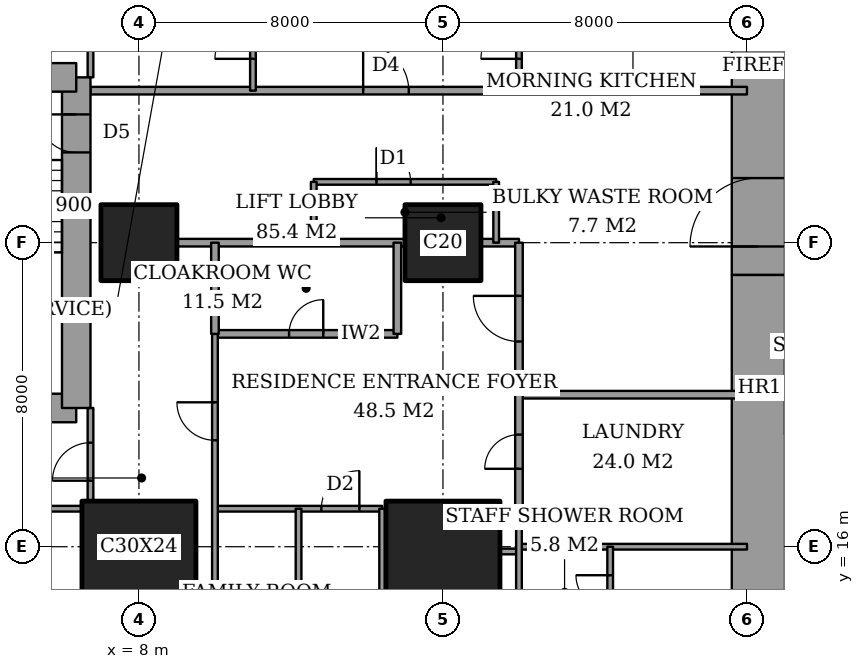
"""IFC4 building model, lengths in metres.
Left out: names, types, materials, properties, quantities, classifications, styles, units other than length and angle.
Written with IfcOpenShell. Run it as: python <this file> out.ifc"""

import sys

from ifc_helpers import new_model, si_unit, direction, frame, frame_2d, origin, origin_2d, place, context, subcontext, project, spatial, rectangle, extrude, element, fill, save


model = new_model("IFC4")
c1 = context("Model", 3, precision=1e-05, world=origin(), true_north=direction((0.0, 1.0)))
c2 = subcontext(c1, "Body", "Model", "MODEL_VIEW")
j1 = project(units=[si_unit("LENGTHUNIT", "METRE"), si_unit("PLANEANGLEUNIT", "RADIAN")], contexts=[c1])
p1 = place(None, origin())
s1 = spatial("IfcSite", under=j1, at=p1, CompositionType="ELEMENT")
p2 = place(p1, origin())
s2 = spatial("IfcBuilding", under=s1, at=p2, CompositionType="ELEMENT")
p3 = place(p2, frame((0.0, 0.0, 128.6)))
s3 = spatial("IfcBuildingStorey", under=s2, at=p3, CompositionType="ELEMENT", Elevation=128.6)
p4 = place(p3, frame((8.0, 16.0, 0.0), z_axis=(0.0, 0.0, 1.0), x_axis=(1.0, 0.0, 0.0)))
e1 = element("IfcColumn", 1, at=p4, inside=s3, PredefinedType="COLUMN", context=c2, shape_type="SweptSolid", body=[
    extrude(rectangle(XDim=3.0, YDim=2.4, at=origin_2d()), origin(), (0.0, 0.0, 1.0), 3.6),
])
p5 = place(p3, frame((8.0, 24.0, 0.0), z_axis=(0.0, 0.0, 1.0), x_axis=(1.0, 0.0, 0.0)))
e2 = element("IfcColumn", 2, at=p5, inside=s3, PredefinedType="COLUMN", context=c2, shape_type="SweptSolid", body=[
    extrude(rectangle(XDim=2.0, YDim=2.0, at=origin_2d()), origin(), (0.0, 0.0, 1.0), 3.6),
])
p6 = place(p3, frame((16.0, 16.0, 0.0), z_axis=(0.0, 0.0, 1.0), x_axis=(1.0, 0.0, 0.0)))
e3 = element("IfcColumn", 3, at=p6, inside=s3, PredefinedType="COLUMN", context=c2, shape_type="SweptSolid", body=[
    extrude(rectangle(XDim=3.0, YDim=2.4, at=origin_2d()), origin(), (0.0, 0.0, 1.0), 3.6),
])
p7 = place(p3, frame((16.0, 24.0, 0.0), z_axis=(0.0, 0.0, 1.0), x_axis=(1.0, 0.0, 0.0)))
e4 = element("IfcColumn", 4, at=p7, inside=s3, PredefinedType="COLUMN", context=c2, shape_type="SweptSolid", body=[
    extrude(rectangle(XDim=2.0, YDim=2.0, at=origin_2d()), origin(), (0.0, 0.0, 1.0), 3.6),
])
p8 = place(p3, frame((24.3, 13.0, 0.0), z_axis=(0.0, 0.0, 1.0), x_axis=(0.0, 1.0, 0.0)))
e5 = element("IfcWall", 5, at=p8, inside=s3, PredefinedType="SHEAR", context=c2, shape_type="SweptSolid", body=[
    extrude(rectangle(XDim=10.15, YDim=1.4, at=frame_2d((5.075, 0.0))), origin(), (0.0, 0.0, 1.0), 3.6),
])
p9 = place(p3, frame((24.3, 23.15, 0.0), z_axis=(0.0, 0.0, 1.0), x_axis=(0.0, 1.0, 0.0)))
e6 = element("IfcWall", 6, at=p9, inside=s3, PredefinedType="SHEAR", context=c2, shape_type="SweptSolid", body=[
    extrude(rectangle(XDim=11.85, YDim=1.4, at=frame_2d((5.925, 0.0))), origin(), (0.0, 0.0, 1.0), 3.6),
])
p10 = place(p9, frame((0.75, 0.0, 0.0)))
e7 = element("IfcOpeningElement", 7, at=p10, cuts=e6, PredefinedType="OPENING", context=c2, shape_type="SweptSolid", body=[
    extrude(rectangle(XDim=1.8, YDim=2.4, at=frame_2d((0.9, 1.2))), frame((0.0, 0.71, 0.0), z_axis=(0.0, -1.0, 0.0), x_axis=(1.0, 0.0, 0.0)), (0.0, 0.0, 1.0), 1.42),
])
p11 = place(p3, frame((1.9, 19.65, 0.0), z_axis=(0.0, 0.0, 1.0), x_axis=(1.0, 0.0, 0.0)))
e8 = element("IfcWall", 8, at=p11, inside=s3, PredefinedType="SHEAR", context=c2, shape_type="SweptSolid", body=[
    extrude(rectangle(XDim=4.45, YDim=0.75, at=frame_2d((2.225, 0.0))), origin(), (0.0, 0.0, 1.0), 3.6),
])
p12 = place(p3, frame((6.35, 19.65, 0.0), z_axis=(0.0, 0.0, 1.0), x_axis=(0.0, 1.0, 0.0)))
e9 = element("IfcWall", 9, at=p12, inside=s3, PredefinedType="SHEAR", context=c2, shape_type="SweptSolid", body=[
    extrude(rectangle(XDim=8.7, YDim=0.75, at=frame_2d((4.35, 0.0))), origin(), (0.0, 0.0, 1.0), 3.6),
])
p13 = place(p12, frame((6.725, 0.0, 0.0)))
e10 = element("IfcOpeningElement", 10, at=p13, cuts=e9, PredefinedType="OPENING", context=c2, shape_type="SweptSolid", body=[
    extrude(rectangle(XDim=1.0, YDim=2.1, at=frame_2d((0.5, 1.05))), frame((0.0, 0.385, 0.0), z_axis=(0.0, -1.0, 0.0), x_axis=(1.0, 0.0, 0.0)), (0.0, 0.0, 1.0), 0.77),
])
p14 = place(p3, frame((6.35, 28.35, 0.0), z_axis=(0.0, 0.0, 1.0), x_axis=(-1.0, 0.0, 0.0)))
e11 = element("IfcWall", 11, at=p14, inside=s3, PredefinedType="SHEAR", context=c2, shape_type="SweptSolid", body=[
    extrude(rectangle(XDim=4.45, YDim=0.75, at=frame_2d((2.225, 0.0))), origin(), (0.0, 0.0, 1.0), 3.6),
])
p15 = place(p3, frame((17.5, 15.875, 0.0), z_axis=(0.0, 0.0, 1.0), x_axis=(1.0, 0.0, 0.0)))
e12 = element("IfcWall", 12, at=p15, inside=s3, PredefinedType="PARTITIONING", context=c2, shape_type="SweptSolid", body=[
    extrude(rectangle(XDim=0.5, YDim=0.15, at=frame_2d((0.25, 0.0))), origin(), (0.0, 0.0, 1.0), 3.35),
])
p16 = place(p3, frame((18.0, 16.0, 0.0), z_axis=(0.0, 0.0, 1.0), x_axis=(1.0, 0.0, 0.0)))
e13 = element("IfcWall", 13, at=p16, inside=s3, PredefinedType="PARTITIONING", context=c2, shape_type="SweptSolid", body=[
    extrude(rectangle(XDim=6.0, YDim=0.15, at=frame_2d((3.0, 0.0))), origin(), (0.0, 0.0, 1.0), 3.35),
])
p17 = place(p3, frame((1.35, 17.0, 0.0), z_axis=(0.0, 0.0, 1.0), x_axis=(1.0, 0.0, 0.0)))
e14 = element("IfcWall", 14, at=p17, inside=s3, PredefinedType="PARTITIONING", context=c2, shape_type="SweptSolid", body=[
    extrude(rectangle(XDim=5.15, YDim=0.15, at=frame_2d((2.575, 0.0))), origin(), (0.0, 0.0, 1.0), 3.35),
])
p18 = place(p3, frame((10.0, 17.0, 0.0), z_axis=(0.0, 0.0, 1.0), x_axis=(1.0, 0.0, 0.0)))
e15 = element("IfcWall", 15, at=p18, inside=s3, PredefinedType="PARTITIONING", context=c2, shape_type="SweptSolid", body=[
    extrude(rectangle(XDim=4.4, YDim=0.15, at=frame_2d((2.2, 0.0))), origin(), (0.0, 0.0, 1.0), 3.35),
])
p19 = place(p18, frame((2.8, 0.0, 0.0)))
e16 = element("IfcOpeningElement", 16, at=p19, cuts=e15, PredefinedType="OPENING", context=c2, shape_type="SweptSolid", body=[
    extrude(rectangle(XDim=1.0, YDim=2.1, at=frame_2d((0.5, 1.05))), frame((0.0, 0.085, 0.0), z_axis=(0.0, -1.0, 0.0), x_axis=(1.0, 0.0, 0.0)), (0.0, 0.0, 1.0), 0.17),
])
p20 = place(p3, frame((18.0, 20.0, 0.0), z_axis=(0.0, 0.0, 1.0), x_axis=(1.0, 0.0, 0.0)))
e17 = element("IfcWall", 17, at=p20, inside=s3, PredefinedType="PARTITIONING", context=c2, shape_type="SweptSolid", body=[
    extrude(rectangle(XDim=6.0, YDim=0.2, at=frame_2d((3.0, 0.0))), origin(), (0.0, 0.0, 1.0), 3.35),
])
p21 = place(p3, frame((10.0, 21.6, 0.0), z_axis=(0.0, 0.0, 1.0), x_axis=(1.0, 0.0, 0.0)))
e18 = element("IfcWall", 18, at=p21, inside=s3, PredefinedType="PARTITIONING", context=c2, shape_type="SweptSolid", body=[
    extrude(rectangle(XDim=4.8, YDim=0.2, at=frame_2d((2.4, 0.0))), origin(), (0.0, 0.0, 1.0), 3.35),
])
p22 = place(p21, frame((1.95, 0.0, 0.0)))
e19 = element("IfcOpeningElement", 19, at=p22, cuts=e18, PredefinedType="OPENING", context=c2, shape_type="SweptSolid", body=[
    extrude(rectangle(XDim=0.9, YDim=2.1, at=frame_2d((0.45, 1.05))), frame((0.0, 0.11, 0.0), z_axis=(0.0, -1.0, 0.0), x_axis=(1.0, 0.0, 0.0)), (0.0, 0.0, 1.0), 0.22),
])
p23 = place(p3, frame((9.0, 24.0, 0.0), z_axis=(0.0, 0.0, 1.0), x_axis=(1.0, 0.0, 0.0)))
e20 = element("IfcWall", 20, at=p23, inside=s3, PredefinedType="PARTITIONING", context=c2, shape_type="SweptSolid", body=[
    extrude(rectangle(XDim=6.0, YDim=0.2, at=frame_2d((3.0, 0.0))), origin(), (0.0, 0.0, 1.0), 3.35),
])
p24 = place(p3, frame((17.0, 24.0, 0.0), z_axis=(0.0, 0.0, 1.0), x_axis=(1.0, 0.0, 0.0)))
e21 = element("IfcWall", 21, at=p24, inside=s3, PredefinedType="PARTITIONING", context=c2, shape_type="SweptSolid", body=[
    extrude(rectangle(XDim=1.0, YDim=0.2, at=frame_2d((0.5, 0.0))), origin(), (0.0, 0.0, 1.0), 3.35),
])
p25 = place(p3, frame((12.6, 25.6, 0.0), z_axis=(0.0, 0.0, 1.0), x_axis=(1.0, 0.0, 0.0)))
e22 = element("IfcWall", 22, at=p25, inside=s3, PredefinedType="PARTITIONING", context=c2, shape_type="SweptSolid", body=[
    extrude(rectangle(XDim=4.8, YDim=0.15, at=frame_2d((2.4, 0.0))), origin(), (0.0, 0.0, 1.0), 3.35),
])
p26 = place(p25, frame((1.65, 0.0, 0.0)))
e23 = element("IfcOpeningElement", 23, at=p26, cuts=e22, PredefinedType="OPENING", context=c2, shape_type="SweptSolid", body=[
    extrude(rectangle(XDim=0.9, YDim=2.1, at=frame_2d((0.45, 1.05))), frame((0.0, 0.085, 0.0), z_axis=(0.0, -1.0, 0.0), x_axis=(1.0, 0.0, 0.0)), (0.0, 0.0, 1.0), 0.17),
])
p27 = place(p3, frame((6.725, 28.0, 0.0), z_axis=(0.0, 0.0, 1.0), x_axis=(1.0, 0.0, 0.0)))
e24 = element("IfcWall", 24, at=p27, inside=s3, PredefinedType="PARTITIONING", context=c2, shape_type="SweptSolid", body=[
    extrude(rectangle(XDim=17.275, YDim=0.2, at=frame_2d((8.637, 0.0))), origin(), (0.0, 0.0, 1.0), 3.35),
])
p28 = place(p27, frame((7.175, 0.0, 0.0)))
e25 = element("IfcOpeningElement", 25, at=p28, cuts=e24, PredefinedType="OPENING", context=c2, shape_type="SweptSolid", body=[
    extrude(rectangle(XDim=1.2, YDim=2.4, at=frame_2d((0.6, 1.2))), frame((0.0, 0.11, 0.0), z_axis=(0.0, -1.0, 0.0), x_axis=(1.0, 0.0, 0.0)), (0.0, 0.0, 1.0), 0.22),
])
p29 = place(p3, frame((6.725, 17.2, 0.0), z_axis=(0.0, 0.0, 1.0), x_axis=(0.0, 1.0, 0.0)))
e26 = element("IfcWall", 26, at=p29, inside=s3, PredefinedType="PARTITIONING", context=c2, shape_type="SweptSolid", body=[
    extrude(rectangle(XDim=2.45, YDim=0.15, at=frame_2d((1.225, 0.0))), origin(), (0.0, 0.0, 1.0), 3.35),
])
p30 = place(p29, frame((0.538, 0.0, 0.0)))
e27 = element("IfcOpeningElement", 27, at=p30, cuts=e26, PredefinedType="OPENING", context=c2, shape_type="SweptSolid", body=[
    extrude(rectangle(XDim=1.0, YDim=2.1, at=frame_2d((0.5, 1.05))), frame((0.0, 0.085, 0.0), z_axis=(0.0, -1.0, 0.0), x_axis=(1.0, 0.0, 0.0)), (0.0, 0.0, 1.0), 0.17),
])
p31 = place(p3, frame((6.725, 28.35, 0.0), z_axis=(0.0, 0.0, 1.0), x_axis=(0.0, 1.0, 0.0)))
e28 = element("IfcWall", 28, at=p31, inside=s3, PredefinedType="PARTITIONING", context=c2, shape_type="SweptSolid", body=[
    extrude(rectangle(XDim=2.45, YDim=0.15, at=frame_2d((1.225, 0.0))), origin(), (0.0, 0.0, 1.0), 3.35),
])
p32 = place(p31, frame((0.913, 0.0, 0.0)))
e29 = element("IfcOpeningElement", 29, at=p32, cuts=e28, PredefinedType="OPENING", context=c2, shape_type="SweptSolid", body=[
    extrude(rectangle(XDim=1.0, YDim=2.1, at=frame_2d((0.5, 1.05))), frame((0.0, 0.085, 0.0), z_axis=(0.0, -1.0, 0.0), x_axis=(1.0, 0.0, 0.0)), (0.0, 0.0, 1.0), 0.17),
])
p33 = place(p3, frame((10.0, 21.6, 0.0), z_axis=(0.0, 0.0, 1.0), x_axis=(0.0, 1.0, 0.0)))
e30 = element("IfcWall", 30, at=p33, inside=s3, PredefinedType="PARTITIONING", context=c2, shape_type="SweptSolid", body=[
    extrude(rectangle(XDim=2.4, YDim=0.2, at=frame_2d((1.2, 0.0))), origin(), (0.0, 0.0, 1.0), 3.35),
])
p34 = place(p3, frame((10.0, 10.6, 0.0), z_axis=(0.0, 0.0, 1.0), x_axis=(0.0, 1.0, 0.0)))
e31 = element("IfcWall", 31, at=p34, inside=s3, PredefinedType="PARTITIONING", context=c2, shape_type="SweptSolid", body=[
    extrude(rectangle(XDim=11.0, YDim=0.15, at=frame_2d((5.5, 0.0))), origin(), (0.0, 0.0, 1.0), 3.35),
])
p35 = place(p34, frame((8.2, 0.0, 0.0)))
e32 = element("IfcOpeningElement", 32, at=p35, cuts=e31, PredefinedType="OPENING", context=c2, shape_type="SweptSolid", body=[
    extrude(rectangle(XDim=1.0, YDim=2.1, at=frame_2d((0.5, 1.05))), frame((0.0, 0.085, 0.0), z_axis=(0.0, -1.0, 0.0), x_axis=(1.0, 0.0, 0.0)), (0.0, 0.0, 1.0), 0.17),
])
p36 = place(p3, frame((11.0, 28.0, 0.0), z_axis=(0.0, 0.0, 1.0), x_axis=(0.0, 1.0, 0.0)))
e33 = element("IfcWall", 33, at=p36, inside=s3, PredefinedType="PARTITIONING", context=c2, shape_type="SweptSolid", body=[
    extrude(rectangle(XDim=9.2, YDim=0.15, at=frame_2d((4.6, 0.0))), origin(), (0.0, 0.0, 1.0), 3.35),
])
p37 = place(p36, frame((0.837, 0.0, 0.0)))
e34 = element("IfcOpeningElement", 34, at=p37, cuts=e33, PredefinedType="OPENING", context=c2, shape_type="SweptSolid", body=[
    extrude(rectangle(XDim=1.0, YDim=2.1, at=frame_2d((0.5, 1.05))), frame((0.0, 0.085, 0.0), z_axis=(0.0, -1.0, 0.0), x_axis=(1.0, 0.0, 0.0)), (0.0, 0.0, 1.0), 0.17),
])
p38 = place(p3, frame((12.2, 10.6, 0.0), z_axis=(0.0, 0.0, 1.0), x_axis=(0.0, 1.0, 0.0)))
e35 = element("IfcWall", 35, at=p38, inside=s3, PredefinedType="PARTITIONING", context=c2, shape_type="SweptSolid", body=[
    extrude(rectangle(XDim=6.4, YDim=0.15, at=frame_2d((3.2, 0.0))), origin(), (0.0, 0.0, 1.0), 3.35),
])
p39 = place(p3, frame((12.6, 24.0, 0.0), z_axis=(0.0, 0.0, 1.0), x_axis=(0.0, 1.0, 0.0)))
e36 = element("IfcWall", 36, at=p39, inside=s3, PredefinedType="PARTITIONING", context=c2, shape_type="SweptSolid", body=[
    extrude(rectangle(XDim=1.6, YDim=0.15, at=frame_2d((0.8, 0.0))), origin(), (0.0, 0.0, 1.0), 3.35),
])
p40 = place(p3, frame((14.4, 10.6, 0.0), z_axis=(0.0, 0.0, 1.0), x_axis=(0.0, 1.0, 0.0)))
e37 = element("IfcWall", 37, at=p40, inside=s3, PredefinedType="PARTITIONING", context=c2, shape_type="SweptSolid", body=[
    extrude(rectangle(XDim=6.4, YDim=0.15, at=frame_2d((3.2, 0.0))), origin(), (0.0, 0.0, 1.0), 3.35),
])
p41 = place(p3, frame((14.8, 21.6, 0.0), z_axis=(0.0, 0.0, 1.0), x_axis=(0.0, 1.0, 0.0)))
e38 = element("IfcWall", 38, at=p41, inside=s3, PredefinedType="PARTITIONING", context=c2, shape_type="SweptSolid", body=[
    extrude(rectangle(XDim=2.4, YDim=0.2, at=frame_2d((1.2, 0.0))), origin(), (0.0, 0.0, 1.0), 3.35),
])
p42 = place(p3, frame((17.4, 24.0, 0.0), z_axis=(0.0, 0.0, 1.0), x_axis=(0.0, 1.0, 0.0)))
e39 = element("IfcWall", 39, at=p42, inside=s3, PredefinedType="PARTITIONING", context=c2, shape_type="SweptSolid", body=[
    extrude(rectangle(XDim=1.6, YDim=0.15, at=frame_2d((0.8, 0.0))), origin(), (0.0, 0.0, 1.0), 3.35),
])
p43 = place(p3, frame((18.0, 17.0, 0.0), z_axis=(0.0, 0.0, 1.0), x_axis=(0.0, 1.0, 0.0)))
e40 = element("IfcWall", 40, at=p43, inside=s3, PredefinedType="PARTITIONING", context=c2, shape_type="SweptSolid", body=[
    extrude(rectangle(XDim=7.0, YDim=0.2, at=frame_2d((3.5, 0.0))), origin(), (0.0, 0.0, 1.0), 3.35),
])
p44 = place(p43, frame((4.4, 0.0, 0.0)))
e41 = element("IfcOpeningElement", 41, at=p44, cuts=e40, PredefinedType="OPENING", context=c2, shape_type="SweptSolid", body=[
    extrude(rectangle(XDim=1.2, YDim=2.4, at=frame_2d((0.6, 1.2))), frame((0.0, 0.11, 0.0), z_axis=(0.0, -1.0, 0.0), x_axis=(1.0, 0.0, 0.0)), (0.0, 0.0, 1.0), 0.22),
])
p45 = place(p43, frame((1.05, 0.0, 0.0)))
e42 = element("IfcOpeningElement", 42, at=p45, cuts=e40, PredefinedType="OPENING", context=c2, shape_type="SweptSolid", body=[
    extrude(rectangle(XDim=0.9, YDim=2.1, at=frame_2d((0.45, 1.05))), frame((0.0, 0.11, 0.0), z_axis=(0.0, -1.0, 0.0), x_axis=(1.0, 0.0, 0.0)), (0.0, 0.0, 1.0), 0.22),
])
p46 = place(p3, frame((18.0, 10.6, 0.0), z_axis=(0.0, 0.0, 1.0), x_axis=(0.0, 1.0, 0.0)))
e43 = element("IfcWall", 43, at=p46, inside=s3, PredefinedType="PARTITIONING", context=c2, shape_type="SweptSolid", body=[
    extrude(rectangle(XDim=6.4, YDim=0.15, at=frame_2d((3.2, 0.0))), origin(), (0.0, 0.0, 1.0), 3.35),
])
p47 = place(p3, frame((18.0, 28.0, 0.0), z_axis=(0.0, 0.0, 1.0), x_axis=(0.0, 1.0, 0.0)))
e44 = element("IfcWall", 44, at=p47, inside=s3, PredefinedType="PARTITIONING", context=c2, shape_type="SweptSolid", body=[
    extrude(rectangle(XDim=9.2, YDim=0.15, at=frame_2d((4.6, 0.0))), origin(), (0.0, 0.0, 1.0), 3.35),
])
p48 = place(p47, frame((0.837, 0.0, 0.0)))
e45 = element("IfcOpeningElement", 45, at=p48, cuts=e44, PredefinedType="OPENING", context=c2, shape_type="SweptSolid", body=[
    extrude(rectangle(XDim=1.0, YDim=2.1, at=frame_2d((0.5, 1.05))), frame((0.0, 0.085, 0.0), z_axis=(0.0, -1.0, 0.0), x_axis=(1.0, 0.0, 0.0)), (0.0, 0.0, 1.0), 0.17),
])
p49 = place(p3, frame((20.4, 13.6, 0.0), z_axis=(0.0, 0.0, 1.0), x_axis=(0.0, 1.0, 0.0)))
e46 = element("IfcWall", 46, at=p49, inside=s3, PredefinedType="PARTITIONING", context=c2, shape_type="SweptSolid", body=[
    extrude(rectangle(XDim=2.4, YDim=0.15, at=frame_2d((1.2, 0.0))), origin(), (0.0, 0.0, 1.0), 3.35),
])
p50 = place(p49, frame((0.75, 0.0, 0.0)))
e47 = element("IfcOpeningElement", 47, at=p50, cuts=e46, PredefinedType="OPENING", context=c2, shape_type="SweptSolid", body=[
    extrude(rectangle(XDim=0.9, YDim=2.1, at=frame_2d((0.45, 1.05))), frame((0.0, 0.085, 0.0), z_axis=(0.0, -1.0, 0.0), x_axis=(1.0, 0.0, 0.0)), (0.0, 0.0, 1.0), 0.17),
])
p51 = place(p30, origin())
e48 = element("IfcDoor", 48, at=p51, inside=s3, OperationType="SINGLE_SWING_RIGHT", PredefinedType="DOOR", context=c2, shape_type="SweptSolid", body=[
    extrude(rectangle(XDim=1.0, YDim=2.1, at=frame_2d((0.5, 1.05))), frame((0.0, 0.025, 0.0), z_axis=(0.0, -1.0, 0.0), x_axis=(1.0, 0.0, 0.0)), (0.0, 0.0, 1.0), 0.05),
])
fill(e27, e48)
p52 = place(p35, origin())
e49 = element("IfcDoor", 49, at=p52, inside=s3, OperationType="SINGLE_SWING_LEFT", PredefinedType="DOOR", context=c2, shape_type="SweptSolid", body=[
    extrude(rectangle(XDim=1.0, YDim=2.1, at=frame_2d((0.5, 1.05))), frame((0.0, 0.025, 0.0), z_axis=(0.0, -1.0, 0.0), x_axis=(1.0, 0.0, 0.0)), (0.0, 0.0, 1.0), 0.05),
])
fill(e32, e49)
p53 = place(p22, origin())
e50 = element("IfcDoor", 50, at=p53, inside=s3, OperationType="SINGLE_SWING_LEFT", PredefinedType="DOOR", context=c2, shape_type="SweptSolid", body=[
    extrude(rectangle(XDim=0.9, YDim=2.1, at=frame_2d((0.45, 1.05))), frame((0.0, 0.025, 0.0), z_axis=(0.0, -1.0, 0.0), x_axis=(1.0, 0.0, 0.0)), (0.0, 0.0, 1.0), 0.05),
])
fill(e19, e50)
p54 = place(p44, origin())
e51 = element("IfcDoor", 51, at=p54, inside=s3, OperationType="SINGLE_SWING_LEFT", PredefinedType="DOOR", context=c2, shape_type="SweptSolid", body=[
    extrude(rectangle(XDim=1.2, YDim=2.4, at=frame_2d((0.6, 1.2))), frame((0.0, 0.025, 0.0), z_axis=(0.0, -1.0, 0.0), x_axis=(1.0, 0.0, 0.0)), (0.0, 0.0, 1.0), 0.05),
])
fill(e41, e51)
p55 = place(p19, origin())
e52 = element("IfcDoor", 52, at=p55, inside=s3, OperationType="SINGLE_SWING_LEFT", PredefinedType="DOOR", context=c2, shape_type="SweptSolid", body=[
    extrude(rectangle(XDim=1.0, YDim=2.1, at=frame_2d((0.5, 1.05))), frame((0.0, 0.025, 0.0), z_axis=(0.0, -1.0, 0.0), x_axis=(1.0, 0.0, 0.0)), (0.0, 0.0, 1.0), 0.05),
])
fill(e16, e52)
p56 = place(p50, origin())
e53 = element("IfcDoor", 53, at=p56, inside=s3, OperationType="SINGLE_SWING_LEFT", PredefinedType="DOOR", context=c2, shape_type="SweptSolid", body=[
    extrude(rectangle(XDim=0.9, YDim=2.1, at=frame_2d((0.45, 1.05))), frame((0.0, 0.025, 0.0), z_axis=(0.0, -1.0, 0.0), x_axis=(1.0, 0.0, 0.0)), (0.0, 0.0, 1.0), 0.05),
])
fill(e47, e53)
p57 = place(p45, origin())
e54 = element("IfcDoor", 54, at=p57, inside=s3, OperationType="SINGLE_SWING_RIGHT", PredefinedType="DOOR", context=c2, shape_type="SweptSolid", body=[
    extrude(rectangle(XDim=0.9, YDim=2.1, at=frame_2d((0.45, 1.05))), frame((0.0, 0.025, 0.0), z_axis=(0.0, -1.0, 0.0), x_axis=(1.0, 0.0, 0.0)), (0.0, 0.0, 1.0), 0.05),
])
fill(e42, e54)
p58 = place(p37, origin())
e55 = element("IfcDoor", 55, at=p58, inside=s3, OperationType="SINGLE_SWING_RIGHT", PredefinedType="DOOR", context=c2, shape_type="SweptSolid", body=[
    extrude(rectangle(XDim=1.0, YDim=2.1, at=frame_2d((0.5, 1.05))), frame((0.0, 0.025, 0.0), z_axis=(0.0, -1.0, 0.0), x_axis=(1.0, 0.0, 0.0)), (0.0, 0.0, 1.0), 0.05),
])
fill(e34, e55)
p59 = place(p28, origin())
e56 = element("IfcDoor", 56, at=p59, inside=s3, OperationType="SINGLE_SWING_RIGHT", PredefinedType="DOOR", context=c2, shape_type="SweptSolid", body=[
    extrude(rectangle(XDim=1.2, YDim=2.4, at=frame_2d((0.6, 1.2))), frame((0.0, 0.025, 0.0), z_axis=(0.0, -1.0, 0.0), x_axis=(1.0, 0.0, 0.0)), (0.0, 0.0, 1.0), 0.05),
])
fill(e25, e56)
p60 = place(p48, origin())
e57 = element("IfcDoor", 57, at=p60, inside=s3, OperationType="SINGLE_SWING_RIGHT", PredefinedType="DOOR", context=c2, shape_type="SweptSolid", body=[
    extrude(rectangle(XDim=1.0, YDim=2.1, at=frame_2d((0.5, 1.05))), frame((0.0, 0.025, 0.0), z_axis=(0.0, -1.0, 0.0), x_axis=(1.0, 0.0, 0.0)), (0.0, 0.0, 1.0), 0.05),
])
fill(e45, e57)
p61 = place(p26, origin())
e58 = element("IfcDoor", 58, at=p61, inside=s3, OperationType="SINGLE_SWING_RIGHT", PredefinedType="DOOR", context=c2, shape_type="SweptSolid", body=[
    extrude(rectangle(XDim=0.9, YDim=2.1, at=frame_2d((0.45, 1.05))), frame((0.0, 0.025, 0.0), z_axis=(0.0, -1.0, 0.0), x_axis=(1.0, 0.0, 0.0)), (0.0, 0.0, 1.0), 0.05),
])
fill(e23, e58)
p62 = place(p10, origin())
e59 = element("IfcDoor", 59, at=p62, inside=s3, OperationType="DOUBLE_DOOR_DOUBLE_SWING", PredefinedType="DOOR", context=c2, shape_type="SweptSolid", body=[
    extrude(rectangle(XDim=1.8, YDim=2.4, at=frame_2d((0.9, 1.2))), frame((0.0, 0.025, 0.0), z_axis=(0.0, -1.0, 0.0), x_axis=(1.0, 0.0, 0.0)), (0.0, 0.0, 1.0), 0.05),
])
fill(e7, e59)
p63 = place(p13, origin())
e60 = element("IfcDoor", 60, at=p63, inside=s3, OperationType="SINGLE_SWING_LEFT", PredefinedType="DOOR", context=c2, shape_type="SweptSolid", body=[
    extrude(rectangle(XDim=1.0, YDim=2.1, at=frame_2d((0.5, 1.05))), frame((0.0, 0.025, 0.0), z_axis=(0.0, -1.0, 0.0), x_axis=(1.0, 0.0, 0.0)), (0.0, 0.0, 1.0), 0.05),
])
fill(e10, e60)
save(model, sys.argv[1])
